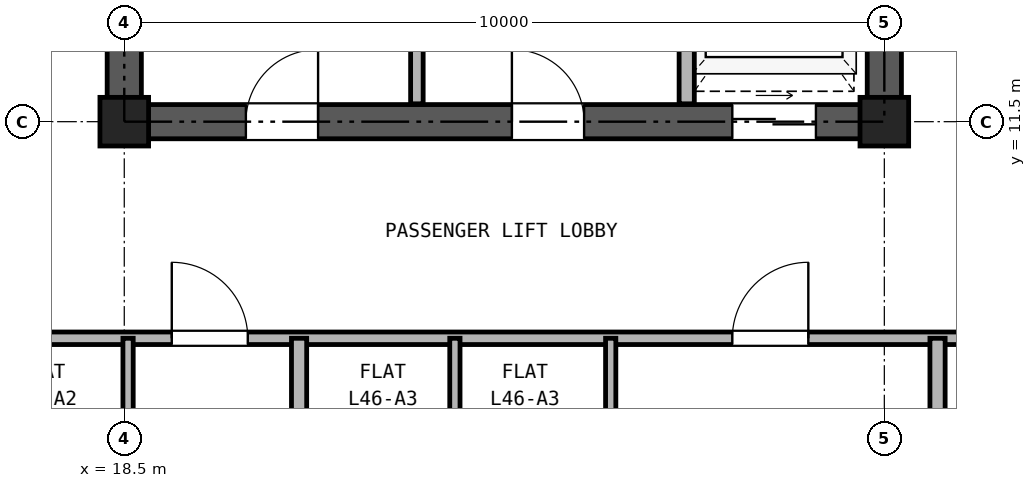
"""IFC4 building model, lengths in metres.
Left out: names, types, materials, properties, quantities, classifications, styles, units other than length and angle.
Written with IfcOpenShell. Run it as: python <this file> out.ifc"""

import sys

from ifc_helpers import new_model, si_unit, direction, frame, frame_2d, origin, origin_2d, place, context, subcontext, project, spatial, rectangle, hollow_rectangle, extrude, source, transform, mapped, element, fill, save


model = new_model("IFC4")
c1 = context("Model", 3, precision=1e-05, world=origin(), true_north=direction((0.0, 1.0)))
c2 = subcontext(c1, "Body", "Model", "MODEL_VIEW")
j1 = project(units=[si_unit("LENGTHUNIT", "METRE"), si_unit("PLANEANGLEUNIT", "RADIAN")], contexts=[c1])
p1 = place(None, origin())
s1 = spatial("IfcSite", under=j1, at=p1, CompositionType="ELEMENT")
p2 = place(p1, origin())
s2 = spatial("IfcBuilding", under=s1, at=p2, CompositionType="ELEMENT")
p3 = place(p2, frame((0.0, 0.0, 165.7)))
s3 = spatial("IfcBuildingStorey", under=s2, at=p3, CompositionType="ELEMENT", Elevation=165.7)
m1 = source(origin(), c2, "Body", "SweptSolid", [
    extrude(hollow_rectangle(XDim=0.64, YDim=0.64, WallThickness=0.035, at=origin_2d()), origin(), (0.0, 0.0, 1.0), 2.95),
])
for number, where, z_axis, x_axis in (
    (1, (18.5, 11.5, 0.0), (0.0, 0.0, 1.0), (1.0, 0.0, 0.0)),
    (2, (28.5, 11.5, 0.0), (0.0, 0.0, 1.0), (1.0, 0.0, 0.0)),
):
    element("IfcColumn", number, at=place(p3, frame(where, z_axis=z_axis, x_axis=x_axis)), inside=s3, PredefinedType="COLUMN", context=c2, shape_type="MappedRepresentation", body=[
        mapped(m1, transform((0.0, 0.0, 0.0), x_axis=(1.0, 0.0, 0.0), y_axis=(0.0, 1.0, 0.0), z_axis=(0.0, 0.0, 1.0), scale=1.0)),
    ])
p4 = place(p3, frame((18.275, 11.5, 0.0), z_axis=(0.0, 0.0, 1.0), x_axis=(1.0, 0.0, 0.0)))
e3 = element("IfcWall", 3, at=p4, inside=s3, PredefinedType="SHEAR", context=c2, shape_type="SweptSolid", body=[
    extrude(rectangle(XDim=10.45, YDim=0.45, at=frame_2d((5.225, 0.0))), origin(), (0.0, 0.0, 1.0), 2.95),
])
p5 = place(p4, frame((1.825, 0.0, 0.0)))
e4 = element("IfcOpeningElement", 4, at=p5, cuts=e3, PredefinedType="OPENING", context=c2, shape_type="SweptSolid", body=[
    extrude(rectangle(XDim=0.95, YDim=2.15, at=frame_2d((0.475, 1.075))), frame((0.0, 0.235, 0.0), z_axis=(0.0, -1.0, 0.0), x_axis=(1.0, 0.0, 0.0)), (0.0, 0.0, 1.0), 0.47),
])
p6 = place(p4, frame((5.325, 0.0, 0.0)))
e5 = element("IfcOpeningElement", 5, at=p6, cuts=e3, PredefinedType="OPENING", context=c2, shape_type="SweptSolid", body=[
    extrude(rectangle(XDim=0.95, YDim=2.15, at=frame_2d((0.475, 1.075))), frame((0.0, 0.235, 0.0), z_axis=(0.0, -1.0, 0.0), x_axis=(1.0, 0.0, 0.0)), (0.0, 0.0, 1.0), 0.47),
])
p7 = place(p4, frame((8.225, 0.0, 0.0)))
e6 = element("IfcOpeningElement", 6, at=p7, cuts=e3, PredefinedType="OPENING", context=c2, shape_type="SweptSolid", body=[
    extrude(rectangle(XDim=1.1, YDim=2.25, at=frame_2d((0.55, 1.125))), frame((0.0, 0.235, 0.0), z_axis=(0.0, -1.0, 0.0), x_axis=(1.0, 0.0, 0.0)), (0.0, 0.0, 1.0), 0.47),
])
p8 = place(p3, frame((18.5, 11.725, 0.0), z_axis=(0.0, 0.0, 1.0), x_axis=(0.0, 1.0, 0.0)))
e7 = element("IfcWall", 7, at=p8, inside=s3, PredefinedType="SHEAR", context=c2, shape_type="SweptSolid", body=[
    extrude(rectangle(XDim=16.8, YDim=0.45, at=frame_2d((8.4, 0.0))), origin(), (0.0, 0.0, 1.0), 2.95),
])
p9 = place(p8, frame((7.425, 0.0, 0.0)))
e8 = element("IfcOpeningElement", 8, at=p9, cuts=e7, PredefinedType="OPENING", context=c2, shape_type="SweptSolid", body=[
    extrude(rectangle(XDim=1.15, YDim=2.2, at=frame_2d((0.575, 1.1))), frame((0.0, 0.235, 0.0), z_axis=(0.0, -1.0, 0.0), x_axis=(1.0, 0.0, 0.0)), (0.0, 0.0, 1.0), 0.47),
])
p10 = place(p3, frame((28.5, 11.725, 0.0), z_axis=(0.0, 0.0, 1.0), x_axis=(0.0, 1.0, 0.0)))
e9 = element("IfcWall", 9, at=p10, inside=s3, PredefinedType="SHEAR", context=c2, shape_type="SweptSolid", body=[
    extrude(rectangle(XDim=16.8, YDim=0.45, at=frame_2d((8.4, 0.0))), origin(), (0.0, 0.0, 1.0), 2.95),
])
p11 = place(p10, frame((7.425, 0.0, 0.0)))
e10 = element("IfcOpeningElement", 10, at=p11, cuts=e9, PredefinedType="OPENING", context=c2, shape_type="SweptSolid", body=[
    extrude(rectangle(XDim=1.15, YDim=2.2, at=frame_2d((0.575, 1.1))), frame((0.0, 0.235, 0.0), z_axis=(0.0, -1.0, 0.0), x_axis=(1.0, 0.0, 0.0)), (0.0, 0.0, 1.0), 0.47),
])
p12 = place(p3, frame((22.35, 11.735, 0.0), z_axis=(0.0, 0.0, 1.0), x_axis=(0.0, 1.0, 0.0)))
e11 = element("IfcWall", 11, at=p12, inside=s3, PredefinedType="PARTITIONING", context=c2, shape_type="SweptSolid", body=[
    extrude(rectangle(XDim=3.265, YDim=0.165, at=frame_2d((1.632, 0.0))), origin(), (0.0, 0.0, 1.0), 2.95),
])
p13 = place(p3, frame((25.9, 11.735, 0.0), z_axis=(0.0, 0.0, 1.0), x_axis=(0.0, 1.0, 0.0)))
e12 = element("IfcWall", 12, at=p13, inside=s3, PredefinedType="PARTITIONING", context=c2, shape_type="SweptSolid", body=[
    extrude(rectangle(XDim=3.265, YDim=0.2, at=frame_2d((1.632, 0.0))), origin(), (0.0, 0.0, 1.0), 2.95),
])
p14 = place(p3, frame((0.16, 8.65, 0.0), z_axis=(0.0, 0.0, 1.0), x_axis=(1.0, 0.0, 0.0)))
e13 = element("IfcWall", 13, at=p14, inside=s3, PredefinedType="PARTITIONING", context=c2, shape_type="SweptSolid", body=[
    extrude(rectangle(XDim=41.48, YDim=0.165, at=frame_2d((20.74, 0.0))), origin(), (0.0, 0.0, 1.0), 2.583),
])
p15 = place(p14, frame((9.39, 0.0, 0.0)))
e14 = element("IfcOpeningElement", 14, at=p15, cuts=e13, PredefinedType="OPENING", context=c2, shape_type="SweptSolid", body=[
    extrude(rectangle(XDim=1.0, YDim=2.15, at=frame_2d((0.5, 1.075))), frame((0.0, 0.093, 0.0), z_axis=(0.0, -1.0, 0.0), x_axis=(1.0, 0.0, 0.0)), (0.0, 0.0, 1.0), 0.185),
])
p16 = place(p14, frame((18.965, 0.0, 0.0)))
e15 = element("IfcOpeningElement", 15, at=p16, cuts=e13, PredefinedType="OPENING", context=c2, shape_type="SweptSolid", body=[
    extrude(rectangle(XDim=1.0, YDim=2.15, at=frame_2d((0.5, 1.075))), frame((0.0, 0.093, 0.0), z_axis=(0.0, -1.0, 0.0), x_axis=(1.0, 0.0, 0.0)), (0.0, 0.0, 1.0), 0.185),
])
p17 = place(p14, frame((26.34, 0.0, 0.0)))
e16 = element("IfcOpeningElement", 16, at=p17, cuts=e13, PredefinedType="OPENING", context=c2, shape_type="SweptSolid", body=[
    extrude(rectangle(XDim=1.0, YDim=2.15, at=frame_2d((0.5, 1.075))), frame((0.0, 0.093, 0.0), z_axis=(0.0, -1.0, 0.0), x_axis=(1.0, 0.0, 0.0)), (0.0, 0.0, 1.0), 0.185),
])
p18 = place(p14, frame((31.715, 0.0, 0.0)))
e17 = element("IfcOpeningElement", 17, at=p18, cuts=e13, PredefinedType="OPENING", context=c2, shape_type="SweptSolid", body=[
    extrude(rectangle(XDim=1.0, YDim=2.15, at=frame_2d((0.5, 1.075))), frame((0.0, 0.093, 0.0), z_axis=(0.0, -1.0, 0.0), x_axis=(1.0, 0.0, 0.0)), (0.0, 0.0, 1.0), 0.185),
])
p19 = place(p3, frame((18.55, 6.5, 0.0), z_axis=(0.0, 0.0, 1.0), x_axis=(0.0, 1.0, 0.0)))
e18 = element("IfcWall", 18, at=p19, inside=s3, PredefinedType="PARTITIONING", context=c2, shape_type="SweptSolid", body=[
    extrude(rectangle(XDim=2.15, YDim=0.135, at=frame_2d((1.075, 0.0))), origin(), (0.0, 0.0, 1.0), 2.323),
])
p20 = place(p3, frame((20.8, 0.16, 0.0), z_axis=(0.0, 0.0, 1.0), x_axis=(0.0, 1.0, 0.0)))
e19 = element("IfcWall", 19, at=p20, inside=s3, PredefinedType="PARTITIONING", context=c2, shape_type="SweptSolid", body=[
    extrude(rectangle(XDim=8.49, YDim=0.2, at=frame_2d((4.245, 0.0))), origin(), (0.0, 0.0, 1.0), 2.95),
])
for number, where, z_axis, x_axis in (
    (20, (22.85, 6.5, 0.0), (0.0, 0.0, 1.0), (0.0, 1.0, 0.0)),
    (21, (24.9, 6.5, 0.0), (0.0, 0.0, 1.0), (0.0, 1.0, 0.0)),
):
    element("IfcWall", number, at=place(p3, frame(where, z_axis=z_axis, x_axis=x_axis)), inside=s3, PredefinedType="PARTITIONING", context=c2, shape_type="SweptSolid", body=[
        extrude(rectangle(XDim=2.15, YDim=0.135, at=frame_2d((1.075, 0.0))), origin(), (0.0, 0.0, 1.0), 2.95),
    ])
p21 = place(p3, frame((29.2, 0.16, 0.0), z_axis=(0.0, 0.0, 1.0), x_axis=(0.0, 1.0, 0.0)))
e22 = element("IfcWall", 22, at=p21, inside=s3, PredefinedType="PARTITIONING", context=c2, shape_type="SweptSolid", body=[
    extrude(rectangle(XDim=8.49, YDim=0.2, at=frame_2d((4.245, 0.0))), origin(), (0.0, 0.0, 1.0), 2.95),
])
p22 = place(p5, frame((0.95, 0.0, 0.0), z_axis=(0.0, 0.0, 1.0), x_axis=(-1.0, 0.0, 0.0)))
e23 = element("IfcDoor", 23, at=p22, inside=s3, OperationType="SINGLE_SWING_RIGHT", PredefinedType="DOOR", context=c2, shape_type="SweptSolid", body=[
    extrude(rectangle(XDim=0.95, YDim=2.15, at=frame_2d((0.475, 1.075))), frame((0.0, 0.025, 0.0), z_axis=(0.0, -1.0, 0.0), x_axis=(1.0, 0.0, 0.0)), (0.0, 0.0, 1.0), 0.05),
])
fill(e4, e23)
p23 = place(p6, frame((0.95, 0.0, 0.0), z_axis=(0.0, 0.0, 1.0), x_axis=(-1.0, 0.0, 0.0)))
e24 = element("IfcDoor", 24, at=p23, inside=s3, OperationType="SINGLE_SWING_LEFT", PredefinedType="DOOR", context=c2, shape_type="SweptSolid", body=[
    extrude(rectangle(XDim=0.95, YDim=2.15, at=frame_2d((0.475, 1.075))), frame((0.0, 0.025, 0.0), z_axis=(0.0, -1.0, 0.0), x_axis=(1.0, 0.0, 0.0)), (0.0, 0.0, 1.0), 0.05),
])
fill(e5, e24)
p24 = place(p7, frame((1.1, 0.0, 0.0), z_axis=(0.0, 0.0, 1.0), x_axis=(-1.0, 0.0, 0.0)))
e25 = element("IfcDoor", 25, at=p24, inside=s3, OperationType="DOUBLE_DOOR_SLIDING", PredefinedType="DOOR", context=c2, shape_type="SweptSolid", body=[
    extrude(rectangle(XDim=1.1, YDim=2.25, at=frame_2d((0.55, 1.125))), frame((0.0, 0.025, 0.0), z_axis=(0.0, -1.0, 0.0), x_axis=(1.0, 0.0, 0.0)), (0.0, 0.0, 1.0), 0.05),
])
fill(e6, e25)
p25 = place(p16, frame((1.0, 0.0, 0.0), z_axis=(0.0, 0.0, 1.0), x_axis=(-1.0, 0.0, 0.0)))
e26 = element("IfcDoor", 26, at=p25, inside=s3, OperationType="SINGLE_SWING_LEFT", PredefinedType="DOOR", context=c2, shape_type="SweptSolid", body=[
    extrude(rectangle(XDim=1.0, YDim=2.15, at=frame_2d((0.5, 1.075))), frame((0.0, 0.025, 0.0), z_axis=(0.0, -1.0, 0.0), x_axis=(1.0, 0.0, 0.0)), (0.0, 0.0, 1.0), 0.05),
])
fill(e15, e26)
p26 = place(p17, frame((1.0, 0.0, 0.0), z_axis=(0.0, 0.0, 1.0), x_axis=(-1.0, 0.0, 0.0)))
e27 = element("IfcDoor", 27, at=p26, inside=s3, OperationType="SINGLE_SWING_RIGHT", PredefinedType="DOOR", context=c2, shape_type="SweptSolid", body=[
    extrude(rectangle(XDim=1.0, YDim=2.15, at=frame_2d((0.5, 1.075))), frame((0.0, 0.025, 0.0), z_axis=(0.0, -1.0, 0.0), x_axis=(1.0, 0.0, 0.0)), (0.0, 0.0, 1.0), 0.05),
])
fill(e16, e27)
save(model, sys.argv[1])
